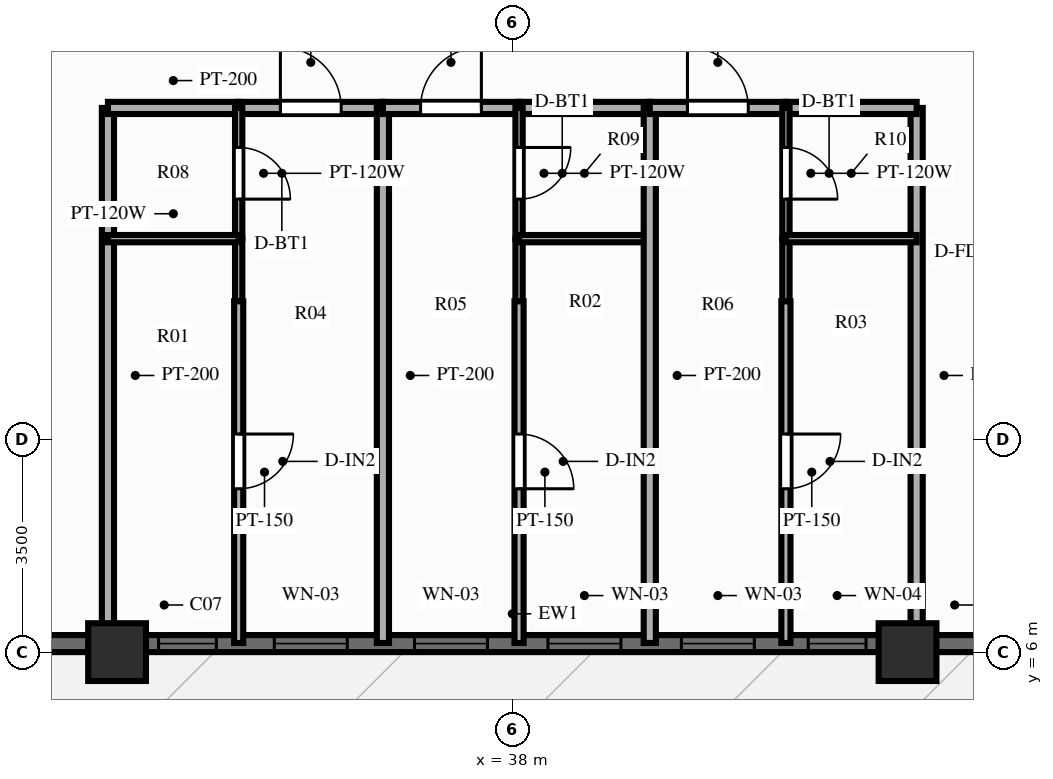
"""IFC4 building model, lengths in metres.
Left out: names, types, materials, properties, quantities, classifications, styles, units other than length and angle.
Written with IfcOpenShell. Run it as: python <this file> out.ifc"""

import sys

from ifc_helpers import new_model, si_unit, direction, frame, frame_2d, origin, origin_2d, place, context, subcontext, project, spatial, rectangle, extrude, source, transform, mapped, element, fill, save


model = new_model("IFC4")
c1 = context("Model", 3, precision=1e-05, world=origin(), true_north=direction((0.0, 1.0)))
c2 = subcontext(c1, "Body", "Model", "MODEL_VIEW")
j1 = project(units=[si_unit("LENGTHUNIT", "METRE"), si_unit("PLANEANGLEUNIT", "RADIAN")], contexts=[c1])
p1 = place(None, origin())
s1 = spatial("IfcSite", under=j1, at=p1, CompositionType="ELEMENT")
p2 = place(p1, origin())
s2 = spatial("IfcBuilding", under=s1, at=p2, CompositionType="ELEMENT")
p3 = place(p2, frame((0.0, 0.0, 166.0)))
s3 = spatial("IfcBuildingStorey", under=s2, at=p3, CompositionType="ELEMENT", Elevation=166.0)
m1 = source(origin(), c2, "Body", "SweptSolid", [
    extrude(rectangle(XDim=0.95, YDim=0.95, at=origin_2d()), origin(), (0.0, 0.0, 1.0), 3.0),
])
for number, where, z_axis, x_axis in (
    (1, (31.5, 6.0, 0.0), (0.0, 0.0, 1.0), (1.0, 0.0, 0.0)),
    (2, (44.5, 6.0, 0.0), (0.0, 0.0, 1.0), (1.0, 0.0, 0.0)),
):
    element("IfcColumn", number, at=place(p3, frame(where, z_axis=z_axis, x_axis=x_axis)), inside=s3, PredefinedType="COLUMN", context=c2, shape_type="MappedRepresentation", body=[
        mapped(m1, transform((0.0, 0.0, 0.0), scale=1.0)),
    ])
p4 = place(p3, frame((21.0, 6.14, 0.0), z_axis=(0.0, 0.0, 1.0), x_axis=(1.0, 0.0, 0.0)))
e3 = element("IfcWall", 3, at=p4, inside=s3, PredefinedType="SOLIDWALL", context=c2, shape_type="SweptSolid", body=[
    extrude(rectangle(XDim=34.0, YDim=0.28, at=frame_2d((17.0, 0.0))), origin(), (0.0, 0.0, 1.0), 2.28),
])
p5 = place(p4, frame((5.8, 0.0, 0.0), z_axis=(0.0, 0.0, 1.0), x_axis=(-1.0, 0.0, 0.0)))
e4 = element("IfcOpeningElement", 4, at=p5, cuts=e3, PredefinedType="OPENING", context=c2, shape_type="SweptSolid", body=[
    extrude(rectangle(XDim=1.1, YDim=2.15, at=frame_2d((0.55, 1.075))), frame((0.0, 0.152, 0.0), z_axis=(0.0, -1.0, 0.0), x_axis=(1.0, 0.0, 0.0)), (0.0, 0.0, 1.0), 0.304),
])
p6 = place(p4, frame((11.183, 0.0, 0.25)))
e5 = element("IfcOpeningElement", 5, at=p6, cuts=e3, PredefinedType="OPENING", context=c2, shape_type="SweptSolid", body=[
    extrude(rectangle(XDim=0.95, YDim=1.5, at=frame_2d((0.475, 0.75))), frame((0.0, 0.152, 0.0), z_axis=(0.0, -1.0, 0.0), x_axis=(1.0, 0.0, 0.0)), (0.0, 0.0, 1.0), 0.304),
])
p7 = place(p4, frame((13.086, 0.0, 0.25)))
e6 = element("IfcOpeningElement", 6, at=p7, cuts=e3, PredefinedType="OPENING", context=c2, shape_type="SweptSolid", body=[
    extrude(rectangle(XDim=1.2, YDim=1.5, at=frame_2d((0.6, 0.75))), frame((0.0, 0.152, 0.0), z_axis=(0.0, -1.0, 0.0), x_axis=(1.0, 0.0, 0.0)), (0.0, 0.0, 1.0), 0.304),
])
p8 = place(p4, frame((15.392, 0.0, 0.25)))
e7 = element("IfcOpeningElement", 7, at=p8, cuts=e3, PredefinedType="OPENING", context=c2, shape_type="SweptSolid", body=[
    extrude(rectangle(XDim=1.2, YDim=1.5, at=frame_2d((0.6, 0.75))), frame((0.0, 0.152, 0.0), z_axis=(0.0, -1.0, 0.0), x_axis=(1.0, 0.0, 0.0)), (0.0, 0.0, 1.0), 0.304),
])
p9 = place(p4, frame((17.586, 0.0, 0.25)))
e8 = element("IfcOpeningElement", 8, at=p9, cuts=e3, PredefinedType="OPENING", context=c2, shape_type="SweptSolid", body=[
    extrude(rectangle(XDim=1.2, YDim=1.5, at=frame_2d((0.6, 0.75))), frame((0.0, 0.152, 0.0), z_axis=(0.0, -1.0, 0.0), x_axis=(1.0, 0.0, 0.0)), (0.0, 0.0, 1.0), 0.304),
])
p10 = place(p4, frame((19.781, 0.0, 0.25)))
e9 = element("IfcOpeningElement", 9, at=p10, cuts=e3, PredefinedType="OPENING", context=c2, shape_type="SweptSolid", body=[
    extrude(rectangle(XDim=1.2, YDim=1.5, at=frame_2d((0.6, 0.75))), frame((0.0, 0.152, 0.0), z_axis=(0.0, -1.0, 0.0), x_axis=(1.0, 0.0, 0.0)), (0.0, 0.0, 1.0), 0.304),
])
p11 = place(p4, frame((21.867, 0.0, 0.25)))
e10 = element("IfcOpeningElement", 10, at=p11, cuts=e3, PredefinedType="OPENING", context=c2, shape_type="SweptSolid", body=[
    extrude(rectangle(XDim=0.95, YDim=1.5, at=frame_2d((0.475, 0.75))), frame((0.0, 0.152, 0.0), z_axis=(0.0, -1.0, 0.0), x_axis=(1.0, 0.0, 0.0)), (0.0, 0.0, 1.0), 0.304),
])
p12 = place(p4, frame((28.15, 0.0, 0.25)))
e11 = element("IfcOpeningElement", 11, at=p12, cuts=e3, PredefinedType="OPENING", context=c2, shape_type="SweptSolid", body=[
    extrude(rectangle(XDim=1.2, YDim=1.5, at=frame_2d((0.6, 0.75))), frame((0.0, 0.152, 0.0), z_axis=(0.0, -1.0, 0.0), x_axis=(1.0, 0.0, 0.0)), (0.0, 0.0, 1.0), 0.304),
])
for number, where, z_axis, x_axis in (
    (12, (31.35, 14.95, 0.0), (0.0, 0.0, 1.0), (0.0, -1.0, 0.0)),
    (13, (44.65, 14.95, 0.0), (0.0, 0.0, 1.0), (0.0, -1.0, 0.0)),
):
    element("IfcWall", number, at=place(p3, frame(where, z_axis=z_axis, x_axis=x_axis)), inside=s3, PredefinedType="PARTITIONING", context=c2, shape_type="SweptSolid", body=[
        extrude(rectangle(XDim=8.8, YDim=0.2, at=frame_2d((4.4, 0.0))), origin(), (0.0, 0.0, 1.0), 2.34),
    ])
p13 = place(p3, frame((31.35, 14.95, 0.0), z_axis=(0.0, 0.0, 1.0), x_axis=(1.0, 0.0, 0.0)))
e14 = element("IfcWall", 14, at=p13, inside=s3, PredefinedType="PARTITIONING", context=c2, shape_type="SweptSolid", body=[
    extrude(rectangle(XDim=2.15, YDim=0.2, at=frame_2d((1.075, 0.0))), origin(), (0.0, 0.0, 1.0), 2.79),
])
p14 = place(p3, frame((33.5, 14.95, 0.0), z_axis=(0.0, 0.0, 1.0), x_axis=(1.0, 0.0, 0.0)))
e15 = element("IfcWall", 15, at=p14, inside=s3, PredefinedType="PARTITIONING", context=c2, shape_type="SweptSolid", body=[
    extrude(rectangle(XDim=2.372, YDim=0.2, at=frame_2d((1.186, 0.0))), origin(), (0.0, 0.0, 1.0), 2.79),
])
p15 = place(p14, frame((0.686, 0.0, 0.0)))
e16 = element("IfcOpeningElement", 16, at=p15, cuts=e15, PredefinedType="OPENING", context=c2, shape_type="SweptSolid", body=[
    extrude(rectangle(XDim=1.0, YDim=2.15, at=frame_2d((0.5, 1.075))), frame((0.0, 0.112, 0.0), z_axis=(0.0, -1.0, 0.0), x_axis=(1.0, 0.0, 0.0)), (0.0, 0.0, 1.0), 0.224),
])
p16 = place(p3, frame((33.5, 14.95, 0.0), z_axis=(0.0, 0.0, 1.0), x_axis=(0.0, -1.0, 0.0)))
e17 = element("IfcWall", 17, at=p16, inside=s3, PredefinedType="PARTITIONING", context=c2, shape_type="SweptSolid", body=[
    extrude(rectangle(XDim=2.15, YDim=0.12, at=frame_2d((1.075, 0.0))), origin(), (0.0, 0.0, 1.0), 2.79),
])
p17 = place(p16, frame((0.65, 0.0, 0.0)))
e18 = element("IfcOpeningElement", 18, at=p17, cuts=e17, PredefinedType="OPENING", context=c2, shape_type="SweptSolid", body=[
    extrude(rectangle(XDim=0.85, YDim=2.05, at=frame_2d((0.425, 1.025))), frame((0.0, 0.072, 0.0), z_axis=(0.0, -1.0, 0.0), x_axis=(1.0, 0.0, 0.0)), (0.0, 0.0, 1.0), 0.144),
])
p18 = place(p3, frame((33.5, 12.8, 0.0), z_axis=(0.0, 0.0, 1.0), x_axis=(0.0, -1.0, 0.0)))
e19 = element("IfcWall", 19, at=p18, inside=s3, PredefinedType="PARTITIONING", context=c2, shape_type="SweptSolid", body=[
    extrude(rectangle(XDim=1.03, YDim=0.12, at=frame_2d((0.515, 0.0))), origin(), (0.0, 0.0, 1.0), 2.79),
])
p19 = place(p3, frame((31.35, 12.8, 0.0), z_axis=(0.0, 0.0, 1.0), x_axis=(1.0, 0.0, 0.0)))
e20 = element("IfcWall", 20, at=p19, inside=s3, PredefinedType="PARTITIONING", context=c2, shape_type="SweptSolid", body=[
    extrude(rectangle(XDim=2.15, YDim=0.12, at=frame_2d((1.075, 0.0))), origin(), (0.0, 0.0, 1.0), 2.79),
])
p20 = place(p3, frame((33.5, 11.77, 0.0), z_axis=(0.0, 0.0, 1.0), x_axis=(0.0, -1.0, 0.0)))
e21 = element("IfcWall", 21, at=p20, inside=s3, PredefinedType="PARTITIONING", context=c2, shape_type="SweptSolid", body=[
    extrude(rectangle(XDim=5.62, YDim=0.15, at=frame_2d((2.81, 0.0))), origin(), (0.0, 0.0, 1.0), 2.79),
])
p21 = place(p20, frame((2.183, 0.0, 0.0)))
e22 = element("IfcOpeningElement", 22, at=p21, cuts=e21, PredefinedType="OPENING", context=c2, shape_type="SweptSolid", body=[
    extrude(rectangle(XDim=0.9, YDim=2.1, at=frame_2d((0.45, 1.05))), frame((0.0, 0.087, 0.0), z_axis=(0.0, -1.0, 0.0), x_axis=(1.0, 0.0, 0.0)), (0.0, 0.0, 1.0), 0.174),
])
p22 = place(p3, frame((35.872, 14.95, 0.0), z_axis=(0.0, 0.0, 1.0), x_axis=(0.0, -1.0, 0.0)))
e23 = element("IfcWall", 23, at=p22, inside=s3, PredefinedType="PARTITIONING", context=c2, shape_type="SweptSolid", body=[
    extrude(rectangle(XDim=8.8, YDim=0.2, at=frame_2d((4.4, 0.0))), origin(), (0.0, 0.0, 1.0), 2.79),
])
p23 = place(p3, frame((35.872, 14.95, 0.0), z_axis=(0.0, 0.0, 1.0), x_axis=(1.0, 0.0, 0.0)))
e24 = element("IfcWall", 24, at=p23, inside=s3, PredefinedType="PARTITIONING", context=c2, shape_type="SweptSolid", body=[
    extrude(rectangle(XDim=2.239, YDim=0.2, at=frame_2d((1.12, 0.0))), origin(), (0.0, 0.0, 1.0), 2.79),
])
p24 = place(p23, frame((0.619, 0.0, 0.0)))
e25 = element("IfcOpeningElement", 25, at=p24, cuts=e24, PredefinedType="OPENING", context=c2, shape_type="SweptSolid", body=[
    extrude(rectangle(XDim=1.0, YDim=2.15, at=frame_2d((0.5, 1.075))), frame((0.0, 0.112, 0.0), z_axis=(0.0, -1.0, 0.0), x_axis=(1.0, 0.0, 0.0)), (0.0, 0.0, 1.0), 0.224),
])
p25 = place(p3, frame((38.111, 14.95, 0.0), z_axis=(0.0, 0.0, 1.0), x_axis=(1.0, 0.0, 0.0)))
e26 = element("IfcWall", 26, at=p25, inside=s3, PredefinedType="PARTITIONING", context=c2, shape_type="SweptSolid", body=[
    extrude(rectangle(XDim=2.15, YDim=0.2, at=frame_2d((1.075, 0.0))), origin(), (0.0, 0.0, 1.0), 2.79),
])
p26 = place(p3, frame((38.111, 14.95, 0.0), z_axis=(0.0, 0.0, 1.0), x_axis=(0.0, -1.0, 0.0)))
e27 = element("IfcWall", 27, at=p26, inside=s3, PredefinedType="PARTITIONING", context=c2, shape_type="SweptSolid", body=[
    extrude(rectangle(XDim=2.15, YDim=0.12, at=frame_2d((1.075, 0.0))), origin(), (0.0, 0.0, 1.0), 2.79),
])
p27 = place(p26, frame((0.65, 0.0, 0.0)))
e28 = element("IfcOpeningElement", 28, at=p27, cuts=e27, PredefinedType="OPENING", context=c2, shape_type="SweptSolid", body=[
    extrude(rectangle(XDim=0.85, YDim=2.05, at=frame_2d((0.425, 1.025))), frame((0.0, 0.072, 0.0), z_axis=(0.0, -1.0, 0.0), x_axis=(1.0, 0.0, 0.0)), (0.0, 0.0, 1.0), 0.144),
])
p28 = place(p3, frame((38.111, 12.8, 0.0), z_axis=(0.0, 0.0, 1.0), x_axis=(0.0, -1.0, 0.0)))
e29 = element("IfcWall", 29, at=p28, inside=s3, PredefinedType="PARTITIONING", context=c2, shape_type="SweptSolid", body=[
    extrude(rectangle(XDim=1.03, YDim=0.12, at=frame_2d((0.515, 0.0))), origin(), (0.0, 0.0, 1.0), 2.79),
])
p29 = place(p3, frame((38.111, 12.8, 0.0), z_axis=(0.0, 0.0, 1.0), x_axis=(1.0, 0.0, 0.0)))
e30 = element("IfcWall", 30, at=p29, inside=s3, PredefinedType="PARTITIONING", context=c2, shape_type="SweptSolid", body=[
    extrude(rectangle(XDim=2.15, YDim=0.12, at=frame_2d((1.075, 0.0))), origin(), (0.0, 0.0, 1.0), 2.79),
])
p30 = place(p3, frame((38.111, 11.77, 0.0), z_axis=(0.0, 0.0, 1.0), x_axis=(0.0, -1.0, 0.0)))
e31 = element("IfcWall", 31, at=p30, inside=s3, PredefinedType="PARTITIONING", context=c2, shape_type="SweptSolid", body=[
    extrude(rectangle(XDim=5.62, YDim=0.15, at=frame_2d((2.81, 0.0))), origin(), (0.0, 0.0, 1.0), 2.79),
])
p31 = place(p30, frame((2.183, 0.0, 0.0)))
e32 = element("IfcOpeningElement", 32, at=p31, cuts=e31, PredefinedType="OPENING", context=c2, shape_type="SweptSolid", body=[
    extrude(rectangle(XDim=0.9, YDim=2.1, at=frame_2d((0.45, 1.05))), frame((0.0, 0.087, 0.0), z_axis=(0.0, -1.0, 0.0), x_axis=(1.0, 0.0, 0.0)), (0.0, 0.0, 1.0), 0.174),
])
p32 = place(p3, frame((40.261, 14.95, 0.0), z_axis=(0.0, 0.0, 1.0), x_axis=(0.0, -1.0, 0.0)))
e33 = element("IfcWall", 33, at=p32, inside=s3, PredefinedType="PARTITIONING", context=c2, shape_type="SweptSolid", body=[
    extrude(rectangle(XDim=8.8, YDim=0.2, at=frame_2d((4.4, 0.0))), origin(), (0.0, 0.0, 1.0), 2.79),
])
p33 = place(p3, frame((40.261, 14.95, 0.0), z_axis=(0.0, 0.0, 1.0), x_axis=(1.0, 0.0, 0.0)))
e34 = element("IfcWall", 34, at=p33, inside=s3, PredefinedType="PARTITIONING", context=c2, shape_type="SweptSolid", body=[
    extrude(rectangle(XDim=2.239, YDim=0.2, at=frame_2d((1.12, 0.0))), origin(), (0.0, 0.0, 1.0), 2.79),
])
p34 = place(p33, frame((0.619, 0.0, 0.0)))
e35 = element("IfcOpeningElement", 35, at=p34, cuts=e34, PredefinedType="OPENING", context=c2, shape_type="SweptSolid", body=[
    extrude(rectangle(XDim=1.0, YDim=2.15, at=frame_2d((0.5, 1.075))), frame((0.0, 0.112, 0.0), z_axis=(0.0, -1.0, 0.0), x_axis=(1.0, 0.0, 0.0)), (0.0, 0.0, 1.0), 0.224),
])
p35 = place(p3, frame((42.5, 14.95, 0.0), z_axis=(0.0, 0.0, 1.0), x_axis=(1.0, 0.0, 0.0)))
e36 = element("IfcWall", 36, at=p35, inside=s3, PredefinedType="PARTITIONING", context=c2, shape_type="SweptSolid", body=[
    extrude(rectangle(XDim=2.15, YDim=0.2, at=frame_2d((1.075, 0.0))), origin(), (0.0, 0.0, 1.0), 2.79),
])
p36 = place(p3, frame((42.5, 14.95, 0.0), z_axis=(0.0, 0.0, 1.0), x_axis=(0.0, -1.0, 0.0)))
e37 = element("IfcWall", 37, at=p36, inside=s3, PredefinedType="PARTITIONING", context=c2, shape_type="SweptSolid", body=[
    extrude(rectangle(XDim=2.15, YDim=0.12, at=frame_2d((1.075, 0.0))), origin(), (0.0, 0.0, 1.0), 2.79),
])
p37 = place(p36, frame((0.65, 0.0, 0.0)))
e38 = element("IfcOpeningElement", 38, at=p37, cuts=e37, PredefinedType="OPENING", context=c2, shape_type="SweptSolid", body=[
    extrude(rectangle(XDim=0.85, YDim=2.05, at=frame_2d((0.425, 1.025))), frame((0.0, 0.072, 0.0), z_axis=(0.0, -1.0, 0.0), x_axis=(1.0, 0.0, 0.0)), (0.0, 0.0, 1.0), 0.144),
])
p38 = place(p3, frame((42.5, 12.8, 0.0), z_axis=(0.0, 0.0, 1.0), x_axis=(0.0, -1.0, 0.0)))
e39 = element("IfcWall", 39, at=p38, inside=s3, PredefinedType="PARTITIONING", context=c2, shape_type="SweptSolid", body=[
    extrude(rectangle(XDim=1.03, YDim=0.12, at=frame_2d((0.515, 0.0))), origin(), (0.0, 0.0, 1.0), 2.79),
])
p39 = place(p3, frame((42.5, 12.8, 0.0), z_axis=(0.0, 0.0, 1.0), x_axis=(1.0, 0.0, 0.0)))
e40 = element("IfcWall", 40, at=p39, inside=s3, PredefinedType="PARTITIONING", context=c2, shape_type="SweptSolid", body=[
    extrude(rectangle(XDim=2.15, YDim=0.12, at=frame_2d((1.075, 0.0))), origin(), (0.0, 0.0, 1.0), 2.79),
])
p40 = place(p3, frame((42.5, 11.77, 0.0), z_axis=(0.0, 0.0, 1.0), x_axis=(0.0, -1.0, 0.0)))
e41 = element("IfcWall", 41, at=p40, inside=s3, PredefinedType="PARTITIONING", context=c2, shape_type="SweptSolid", body=[
    extrude(rectangle(XDim=5.62, YDim=0.15, at=frame_2d((2.81, 0.0))), origin(), (0.0, 0.0, 1.0), 2.79),
])
p41 = place(p40, frame((2.183, 0.0, 0.0)))
e42 = element("IfcOpeningElement", 42, at=p41, cuts=e41, PredefinedType="OPENING", context=c2, shape_type="SweptSolid", body=[
    extrude(rectangle(XDim=0.9, YDim=2.1, at=frame_2d((0.45, 1.05))), frame((0.0, 0.087, 0.0), z_axis=(0.0, -1.0, 0.0), x_axis=(1.0, 0.0, 0.0)), (0.0, 0.0, 1.0), 0.174),
])
m2 = source(origin(), c2, "Body", "SweptSolid", [
    extrude(rectangle(XDim=0.95, YDim=1.5, at=frame_2d((0.475, 0.75))), frame((0.0, 0.03, 0.0), z_axis=(0.0, -1.0, 0.0), x_axis=(1.0, 0.0, 0.0)), (0.0, 0.0, 1.0), 0.06),
])
p42 = place(p6, origin())
e43 = element("IfcWindow", 43, at=p42, inside=s3, PartitioningType="SINGLE_PANEL", PredefinedType="WINDOW", context=c2, shape_type="MappedRepresentation", body=[
    mapped(m2, transform((0.0, 0.0, 0.0), scale=1.0)),
])
fill(e5, e43)
m3 = source(origin(), c2, "Body", "SweptSolid", [
    extrude(rectangle(XDim=1.2, YDim=1.5, at=frame_2d((0.6, 0.75))), frame((0.0, 0.03, 0.0), z_axis=(0.0, -1.0, 0.0), x_axis=(1.0, 0.0, 0.0)), (0.0, 0.0, 1.0), 0.06),
])
p43 = place(p7, origin())
e44 = element("IfcWindow", 44, at=p43, inside=s3, PartitioningType="SINGLE_PANEL", PredefinedType="WINDOW", context=c2, shape_type="MappedRepresentation", body=[
    mapped(m3, transform((0.0, 0.0, 0.0), scale=1.0)),
])
fill(e6, e44)
p44 = place(p8, origin())
e45 = element("IfcWindow", 45, at=p44, inside=s3, PartitioningType="SINGLE_PANEL", PredefinedType="WINDOW", context=c2, shape_type="MappedRepresentation", body=[
    mapped(m3, transform((0.0, 0.0, 0.0), scale=1.0)),
])
fill(e7, e45)
p45 = place(p9, origin())
e46 = element("IfcWindow", 46, at=p45, inside=s3, PartitioningType="SINGLE_PANEL", PredefinedType="WINDOW", context=c2, shape_type="MappedRepresentation", body=[
    mapped(m3, transform((0.0, 0.0, 0.0), scale=1.0)),
])
fill(e8, e46)
p46 = place(p10, origin())
e47 = element("IfcWindow", 47, at=p46, inside=s3, PartitioningType="SINGLE_PANEL", PredefinedType="WINDOW", context=c2, shape_type="MappedRepresentation", body=[
    mapped(m3, transform((0.0, 0.0, 0.0), scale=1.0)),
])
fill(e9, e47)
p47 = place(p11, origin())
e48 = element("IfcWindow", 48, at=p47, inside=s3, PartitioningType="SINGLE_PANEL", PredefinedType="WINDOW", context=c2, shape_type="MappedRepresentation", body=[
    mapped(m2, transform((0.0, 0.0, 0.0), scale=1.0)),
])
fill(e10, e48)
m4 = source(origin(), c2, "Body", "SweptSolid", [
    extrude(rectangle(XDim=1.0, YDim=2.15, at=frame_2d((0.5, 1.075))), frame((0.0, 0.025, 0.0), z_axis=(0.0, -1.0, 0.0), x_axis=(1.0, 0.0, 0.0)), (0.0, 0.0, 1.0), 0.05),
])
p48 = place(p15, origin())
e49 = element("IfcDoor", 49, at=p48, inside=s3, OperationType="SINGLE_SWING_LEFT", PredefinedType="DOOR", context=c2, shape_type="MappedRepresentation", body=[
    mapped(m4, transform((0.0, 0.0, 0.0), scale=1.0)),
])
fill(e16, e49)
m5 = source(origin(), c2, "Body", "SweptSolid", [
    extrude(rectangle(XDim=0.85, YDim=2.05, at=frame_2d((0.425, 1.025))), frame((0.0, 0.025, 0.0), z_axis=(0.0, -1.0, 0.0), x_axis=(1.0, 0.0, 0.0)), (0.0, 0.0, 1.0), 0.05),
])
p49 = place(p17, origin())
e50 = element("IfcDoor", 50, at=p49, inside=s3, OperationType="SINGLE_SWING_RIGHT", PredefinedType="DOOR", context=c2, shape_type="MappedRepresentation", body=[
    mapped(m5, transform((0.0, 0.0, 0.0), scale=1.0)),
])
fill(e18, e50)
m6 = source(origin(), c2, "Body", "SweptSolid", [
    extrude(rectangle(XDim=0.9, YDim=2.1, at=frame_2d((0.45, 1.05))), frame((0.0, 0.025, 0.0), z_axis=(0.0, -1.0, 0.0), x_axis=(1.0, 0.0, 0.0)), (0.0, 0.0, 1.0), 0.05),
])
p50 = place(p21, origin())
e51 = element("IfcDoor", 51, at=p50, inside=s3, OperationType="SINGLE_SWING_LEFT", PredefinedType="DOOR", context=c2, shape_type="MappedRepresentation", body=[
    mapped(m6, transform((0.0, 0.0, 0.0), scale=1.0)),
])
fill(e22, e51)
p51 = place(p24, origin())
e52 = element("IfcDoor", 52, at=p51, inside=s3, OperationType="SINGLE_SWING_RIGHT", PredefinedType="DOOR", context=c2, shape_type="MappedRepresentation", body=[
    mapped(m4, transform((0.0, 0.0, 0.0), scale=1.0)),
])
fill(e25, e52)
p52 = place(p27, origin())
e53 = element("IfcDoor", 53, at=p52, inside=s3, OperationType="SINGLE_SWING_LEFT", PredefinedType="DOOR", context=c2, shape_type="MappedRepresentation", body=[
    mapped(m5, transform((0.0, 0.0, 0.0), scale=1.0)),
])
fill(e28, e53)
p53 = place(p31, origin())
e54 = element("IfcDoor", 54, at=p53, inside=s3, OperationType="SINGLE_SWING_RIGHT", PredefinedType="DOOR", context=c2, shape_type="MappedRepresentation", body=[
    mapped(m6, transform((0.0, 0.0, 0.0), scale=1.0)),
])
fill(e32, e54)
p54 = place(p34, origin())
e55 = element("IfcDoor", 55, at=p54, inside=s3, OperationType="SINGLE_SWING_LEFT", PredefinedType="DOOR", context=c2, shape_type="MappedRepresentation", body=[
    mapped(m4, transform((0.0, 0.0, 0.0), scale=1.0)),
])
fill(e35, e55)
p55 = place(p37, origin())
e56 = element("IfcDoor", 56, at=p55, inside=s3, OperationType="SINGLE_SWING_RIGHT", PredefinedType="DOOR", context=c2, shape_type="MappedRepresentation", body=[
    mapped(m5, transform((0.0, 0.0, 0.0), scale=1.0)),
])
fill(e38, e56)
p56 = place(p41, origin())
e57 = element("IfcDoor", 57, at=p56, inside=s3, OperationType="SINGLE_SWING_LEFT", PredefinedType="DOOR", context=c2, shape_type="MappedRepresentation", body=[
    mapped(m6, transform((0.0, 0.0, 0.0), scale=1.0)),
])
fill(e42, e57)
save(model, sys.argv[1])
